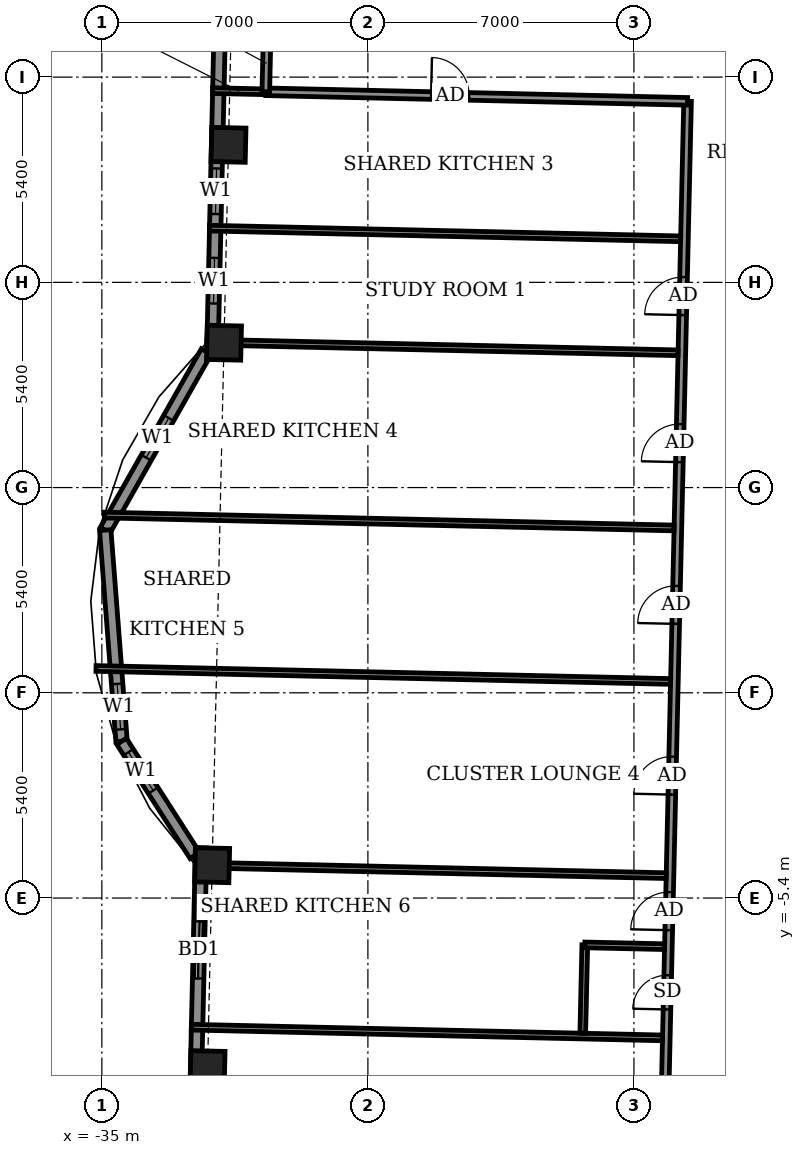
"""IFC4 building model, lengths in metres.
Left out: names, types, materials, properties, quantities, classifications, styles, units other than length and angle.
Written with IfcOpenShell. Run it as: python <this file> out.ifc"""

import sys

from ifc_helpers import new_model, si_unit, direction, frame, frame_2d, origin, origin_2d, place, context, subcontext, project, spatial, rectangle, extrude, element, fill, save


model = new_model("IFC4")
c1 = context("Model", 3, precision=1e-05, world=origin(), true_north=direction((0.0, 1.0)))
c2 = subcontext(c1, "Body", "Model", "MODEL_VIEW")
j1 = project(units=[si_unit("LENGTHUNIT", "METRE"), si_unit("PLANEANGLEUNIT", "RADIAN")], contexts=[c1])
p1 = place(None, origin())
s1 = spatial("IfcSite", under=j1, at=p1, CompositionType="ELEMENT")
p2 = place(p1, origin())
s2 = spatial("IfcBuilding", under=s1, at=p2, CompositionType="ELEMENT")
p3 = place(p2, frame((0.0, 0.0, 309.7)))
s3 = spatial("IfcBuildingStorey", under=s2, at=p3, CompositionType="ELEMENT", Elevation=309.7)
for number, where, z_axis, x_axis in (
    (1, (-32.098, -4.535, -0.55), (0.0, 0.0, 1.0), (-0.023, -1.0, 0.0)),
    (2, (-32.219, -9.875, -0.55), (0.0, 0.0, 1.0), (-0.023, -1.0, 0.0)),
    (3, (-31.668, 14.419, -0.55), (0.0, 0.0, 1.0), (-0.023, -1.0, 0.0)),
    (4, (-31.786, 9.212, -0.55), (0.0, 0.0, 1.0), (-0.023, -1.0, 0.0)),
):
    element("IfcColumn", number, at=place(p3, frame(where, z_axis=z_axis, x_axis=x_axis)), inside=s3, PredefinedType="COLUMN", context=c2, shape_type="SweptSolid", body=[
        extrude(rectangle(XDim=0.9, YDim=0.9, at=origin_2d()), origin(), (0.0, 0.0, 1.0), 3.6),
    ])
p4 = place(p3, frame((-31.735, 24.69, 0.0), z_axis=(0.0, 0.0, 1.0), x_axis=(-0.022658721334, -0.999743258216, 0.0)))
e5 = element("IfcWall", 5, at=p4, inside=s3, PredefinedType="SOLIDWALL", context=c2, shape_type="SweptSolid", body=[
    extrude(rectangle(XDim=15.925, YDim=0.3, at=frame_2d((7.962, 0.0))), origin(), (0.0, 0.0, 1.0), 2.55),
])
p5 = place(p4, frame((1.953, 0.0, 0.0)))
e6 = element("IfcOpeningElement", 6, at=p5, cuts=e5, PredefinedType="OPENING", context=c2, shape_type="SweptSolid", body=[
    extrude(rectangle(XDim=1.5, YDim=2.4, at=frame_2d((0.75, 1.2))), frame((0.0, 0.16, 0.0), z_axis=(0.0, -1.0, 0.0), x_axis=(1.0, 0.0, 0.0)), (0.0, 0.0, 1.0), 0.32),
])
p6 = place(p4, frame((10.896, 0.0, 0.9)))
e7 = element("IfcOpeningElement", 7, at=p6, cuts=e5, PredefinedType="OPENING", context=c2, shape_type="SweptSolid", body=[
    extrude(rectangle(XDim=1.2, YDim=1.5, at=frame_2d((0.6, 0.75))), frame((0.0, 0.16, 0.0), z_axis=(0.0, -1.0, 0.0), x_axis=(1.0, 0.0, 0.0)), (0.0, 0.0, 1.0), 0.32),
])
p7 = place(p4, frame((13.25, 0.0, 0.9)))
e8 = element("IfcOpeningElement", 8, at=p7, cuts=e5, PredefinedType="OPENING", context=c2, shape_type="SweptSolid", body=[
    extrude(rectangle(XDim=1.2, YDim=1.5, at=frame_2d((0.6, 0.75))), frame((0.0, 0.16, 0.0), z_axis=(0.0, -1.0, 0.0), x_axis=(1.0, 0.0, 0.0)), (0.0, 0.0, 1.0), 0.32),
])
p8 = place(p3, frame((-32.252, 8.978, 0.0), z_axis=(0.0, 0.0, 1.0), x_axis=(-0.492554919955, -0.870281363025, 0.0)))
e9 = element("IfcWall", 9, at=p8, inside=s3, PredefinedType="SOLIDWALL", context=c2, shape_type="SweptSolid", body=[
    extrude(rectangle(XDim=5.398, YDim=0.3, at=frame_2d((2.699, 0.0))), origin(), (0.0, 0.0, 1.0), 3.05),
])
p9 = place(p8, frame((2.008, 0.0, 0.9)))
e10 = element("IfcOpeningElement", 10, at=p9, cuts=e9, PredefinedType="OPENING", context=c2, shape_type="SweptSolid", body=[
    extrude(rectangle(XDim=1.2, YDim=1.5, at=frame_2d((0.6, 0.75))), frame((0.0, 0.16, 0.0), z_axis=(0.0, -1.0, 0.0), x_axis=(1.0, 0.0, 0.0)), (0.0, 0.0, 1.0), 0.32),
])
p10 = place(p3, frame((-34.911, 4.28, 0.0), z_axis=(0.0, 0.0, 1.0), x_axis=(0.077135284219, -0.997020635658, 0.0)))
e11 = element("IfcWall", 11, at=p10, inside=s3, PredefinedType="SOLIDWALL", context=c2, shape_type="SweptSolid", body=[
    extrude(rectangle(XDim=5.574, YDim=0.3, at=frame_2d((2.787, 0.0))), origin(), (0.0, 0.0, 1.0), 3.05),
])
p11 = place(p10, frame((4.058, 0.0, 0.9)))
e12 = element("IfcOpeningElement", 12, at=p11, cuts=e11, PredefinedType="OPENING", context=c2, shape_type="SweptSolid", body=[
    extrude(rectangle(XDim=1.2, YDim=1.5, at=frame_2d((0.6, 0.75))), frame((0.0, 0.16, 0.0), z_axis=(0.0, -1.0, 0.0), x_axis=(1.0, 0.0, 0.0)), (0.0, 0.0, 1.0), 0.32),
])
p12 = place(p3, frame((-34.481, -1.277, 0.0), z_axis=(0.0, 0.0, 1.0), x_axis=(0.540460234606, -0.841369558999, 0.0)))
e13 = element("IfcWall", 13, at=p12, inside=s3, PredefinedType="SOLIDWALL", context=c2, shape_type="SweptSolid", body=[
    extrude(rectangle(XDim=3.569, YDim=0.3, at=frame_2d((1.785, 0.0))), origin(), (0.0, 0.0, 1.0), 3.05),
])
p13 = place(p12, frame((0.338, 0.0, 0.9)))
e14 = element("IfcOpeningElement", 14, at=p13, cuts=e13, PredefinedType="OPENING", context=c2, shape_type="SweptSolid", body=[
    extrude(rectangle(XDim=1.2, YDim=1.5, at=frame_2d((0.6, 0.75))), frame((0.0, 0.16, 0.0), z_axis=(0.0, -1.0, 0.0), x_axis=(1.0, 0.0, 0.0)), (0.0, 0.0, 1.0), 0.32),
])
p14 = place(p3, frame((-32.388, -4.079, 0.0), z_axis=(0.0, 0.0, 1.0), x_axis=(-0.022673163436, -0.999742930788, 0.0)))
e15 = element("IfcWall", 15, at=p14, inside=s3, PredefinedType="SOLIDWALL", context=c2, shape_type="SweptSolid", body=[
    extrude(rectangle(XDim=16.324, YDim=0.3, at=frame_2d((8.162, 0.0))), origin(), (0.0, 0.0, 1.0), 2.55),
])
p15 = place(p14, frame((1.937, 0.0, 0.0)))
e16 = element("IfcOpeningElement", 16, at=p15, cuts=e15, PredefinedType="OPENING", context=c2, shape_type="SweptSolid", body=[
    extrude(rectangle(XDim=1.5, YDim=2.4, at=frame_2d((0.75, 1.2))), frame((0.0, 0.16, 0.0), z_axis=(0.0, -1.0, 0.0), x_axis=(1.0, 0.0, 0.0)), (0.0, 0.0, 1.0), 0.32),
])
p16 = place(p14, frame((6.433, 0.0, 0.9)))
e17 = element("IfcOpeningElement", 17, at=p16, cuts=e15, PredefinedType="OPENING", context=c2, shape_type="SweptSolid", body=[
    extrude(rectangle(XDim=0.9, YDim=1.5, at=frame_2d((0.45, 0.75))), frame((0.0, 0.16, 0.0), z_axis=(0.0, -1.0, 0.0), x_axis=(1.0, 0.0, 0.0)), (0.0, 0.0, 1.0), 0.32),
])
p17 = place(p14, frame((12.364, 0.0, 0.9)))
e18 = element("IfcOpeningElement", 18, at=p17, cuts=e15, PredefinedType="OPENING", context=c2, shape_type="SweptSolid", body=[
    extrude(rectangle(XDim=2.4, YDim=1.5, at=frame_2d((1.2, 0.75))), frame((0.0, 0.16, 0.0), z_axis=(0.0, -1.0, 0.0), x_axis=(1.0, 0.0, 0.0)), (0.0, 0.0, 1.0), 0.32),
])
p18 = place(p3, frame((-34.845, 9.532, 0.0), z_axis=(0.0, 0.0, 1.0), x_axis=(0.022681332769, 0.999742745482, 0.0)))
e19 = element("IfcWall", 19, at=p18, inside=s3, PredefinedType="USERDEFINED", context=c2, shape_type="SweptSolid", body=[
    extrude(rectangle(XDim=3.875, YDim=0.55, at=frame_2d((1.938, 0.0))), origin(), (0.0, 0.0, 1.0), 0.8),
])
p19 = place(p3, frame((-35.347, -12.588, 0.0), z_axis=(0.0, 0.0, 1.0), x_axis=(0.022663177671, 0.999743157205, 0.0)))
e20 = element("IfcWall", 20, at=p19, inside=s3, PredefinedType="USERDEFINED", context=c2, shape_type="SweptSolid", body=[
    extrude(rectangle(XDim=6.0, YDim=0.55, at=frame_2d((3.0, 0.0))), origin(), (0.0, 0.0, 1.0), 0.8),
])
p20 = place(p3, frame((-20.216, -12.081, 0.0), z_axis=(0.0, 0.0, 1.0), x_axis=(0.02267447203, 0.999742901109, 0.0)))
e21 = element("IfcWall", 21, at=p20, inside=s3, PredefinedType="PARTITIONING", context=c2, shape_type="SweptSolid", body=[
    extrude(rectangle(XDim=27.65, YDim=0.2, at=frame_2d((13.825, 0.0))), origin(), (0.0, 0.0, 1.0), 3.05),
])
p21 = place(p20, frame((22.025, 0.0, 0.0)))
e22 = element("IfcOpeningElement", 22, at=p21, cuts=e21, PredefinedType="OPENING", context=c2, shape_type="SweptSolid", body=[
    extrude(rectangle(XDim=1.0, YDim=2.1, at=frame_2d((0.5, 1.05))), frame((0.0, 0.11, 0.0), z_axis=(0.0, -1.0, 0.0), x_axis=(1.0, 0.0, 0.0)), (0.0, 0.0, 1.0), 0.22),
])
p22 = place(p20, frame((18.155, 0.0, 0.0)))
e23 = element("IfcOpeningElement", 23, at=p22, cuts=e21, PredefinedType="OPENING", context=c2, shape_type="SweptSolid", body=[
    extrude(rectangle(XDim=1.0, YDim=2.1, at=frame_2d((0.5, 1.05))), frame((0.0, 0.11, 0.0), z_axis=(0.0, -1.0, 0.0), x_axis=(1.0, 0.0, 0.0)), (0.0, 0.0, 1.0), 0.22),
])
p23 = place(p20, frame((13.898, 0.0, 0.0)))
e24 = element("IfcOpeningElement", 24, at=p23, cuts=e21, PredefinedType="OPENING", context=c2, shape_type="SweptSolid", body=[
    extrude(rectangle(XDim=1.0, YDim=2.1, at=frame_2d((0.5, 1.05))), frame((0.0, 0.11, 0.0), z_axis=(0.0, -1.0, 0.0), x_axis=(1.0, 0.0, 0.0)), (0.0, 0.0, 1.0), 0.22),
])
p24 = place(p20, frame((9.405, 0.0, 0.0)))
e25 = element("IfcOpeningElement", 25, at=p24, cuts=e21, PredefinedType="OPENING", context=c2, shape_type="SweptSolid", body=[
    extrude(rectangle(XDim=1.0, YDim=2.1, at=frame_2d((0.5, 1.05))), frame((0.0, 0.11, 0.0), z_axis=(0.0, -1.0, 0.0), x_axis=(1.0, 0.0, 0.0)), (0.0, 0.0, 1.0), 0.22),
])
p25 = place(p20, frame((5.837, 0.0, 0.0)))
e26 = element("IfcOpeningElement", 26, at=p25, cuts=e21, PredefinedType="OPENING", context=c2, shape_type="SweptSolid", body=[
    extrude(rectangle(XDim=1.0, YDim=2.1, at=frame_2d((0.5, 1.05))), frame((0.0, 0.11, 0.0), z_axis=(0.0, -1.0, 0.0), x_axis=(1.0, 0.0, 0.0)), (0.0, 0.0, 1.0), 0.22),
])
p26 = place(p20, frame((3.75, 0.0, 0.0)))
e27 = element("IfcOpeningElement", 27, at=p26, cuts=e21, PredefinedType="OPENING", context=c2, shape_type="SweptSolid", body=[
    extrude(rectangle(XDim=0.9, YDim=2.1, at=frame_2d((0.45, 1.05))), frame((0.0, 0.11, 0.0), z_axis=(0.0, -1.0, 0.0), x_axis=(1.0, 0.0, 0.0)), (0.0, 0.0, 1.0), 0.22),
])
p27 = place(p3, frame((-32.645, -8.798, 0.0), z_axis=(0.0, 0.0, 1.0), x_axis=(0.999741408463, -0.022740189192, 0.0)))
e28 = element("IfcWall", 28, at=p27, inside=s3, PredefinedType="PARTITIONING", context=c2, shape_type="SweptSolid", body=[
    extrude(rectangle(XDim=12.4, YDim=0.15, at=frame_2d((6.2, 0.0))), origin(), (0.0, 0.0, 1.0), 2.55),
])
p28 = place(p3, frame((-22.346, -8.957, 0.0), z_axis=(0.0, 0.0, 1.0), x_axis=(0.02279059109, 0.999740260747, 0.0)))
e29 = element("IfcWall", 29, at=p28, inside=s3, PredefinedType="PARTITIONING", context=c2, shape_type="SweptSolid", body=[
    extrude(rectangle(XDim=2.324, YDim=0.15, at=frame_2d((1.162, 0.0))), origin(), (0.0, 0.0, 1.0), 3.05),
])
p29 = place(p3, frame((-22.293, -6.633, 0.0), z_axis=(0.0, 0.0, 1.0), x_axis=(0.999750703499, -0.022327804475, 0.0)))
e30 = element("IfcWall", 30, at=p29, inside=s3, PredefinedType="PARTITIONING", context=c2, shape_type="SweptSolid", body=[
    extrude(rectangle(XDim=2.099, YDim=0.15, at=frame_2d((1.05, 0.0))), origin(), (0.0, 0.0, 1.0), 3.05),
])
p30 = place(p3, frame((-32.248, -4.536, 0.0), z_axis=(0.0, 0.0, 1.0), x_axis=(0.999741439573, -0.022738821441, 0.0)))
e31 = element("IfcWall", 31, at=p30, inside=s3, PredefinedType="PARTITIONING", context=c2, shape_type="SweptSolid", body=[
    extrude(rectangle(XDim=12.1, YDim=0.15, at=frame_2d((6.05, 0.0))), origin(), (0.0, 0.0, 1.0), 3.05),
])
p31 = place(p3, frame((-35.154, 0.641, 0.0), z_axis=(0.0, 0.0, 1.0), x_axis=(0.99974273487, -0.022681800518, 0.0)))
e32 = element("IfcWall", 32, at=p31, inside=s3, PredefinedType="PARTITIONING", context=c2, shape_type="SweptSolid", body=[
    extrude(rectangle(XDim=15.123, YDim=0.15, at=frame_2d((7.562, 0.0))), origin(), (0.0, 0.0, 1.0), 2.05),
])
p32 = place(p3, frame((-34.934, 4.677, 0.0), z_axis=(0.0, 0.0, 1.0), x_axis=(0.99974273422, -0.022681829163, 0.0)))
e33 = element("IfcWall", 33, at=p32, inside=s3, PredefinedType="PARTITIONING", context=c2, shape_type="SweptSolid", body=[
    extrude(rectangle(XDim=14.994, YDim=0.15, at=frame_2d((7.497, 0.0))), origin(), (0.0, 0.0, 1.0), 2.05),
])
p33 = place(p3, frame((-32.236, 9.227, 0.0), z_axis=(0.0, 0.0, 1.0), x_axis=(0.999743195783, -0.022661475803, 0.0)))
e34 = element("IfcWall", 34, at=p33, inside=s3, PredefinedType="PARTITIONING", context=c2, shape_type="SweptSolid", body=[
    extrude(rectangle(XDim=12.4, YDim=0.15, at=frame_2d((6.2, 0.0))), origin(), (0.0, 0.0, 1.0), 3.05),
])
p34 = place(p3, frame((-32.168, 12.226, 0.0), z_axis=(0.0, 0.0, 1.0), x_axis=(0.999743195783, -0.022661475803, 0.0)))
e35 = element("IfcWall", 35, at=p34, inside=s3, PredefinedType="PARTITIONING", context=c2, shape_type="SweptSolid", body=[
    extrude(rectangle(XDim=12.4, YDim=0.15, at=frame_2d((6.2, 0.0))), origin(), (0.0, 0.0, 1.0), 2.55),
])
p35 = place(p3, frame((-32.086, 15.845, 0.0), z_axis=(0.0, 0.0, 1.0), x_axis=(0.999740667531, -0.022772739949, 0.0)))
e36 = element("IfcWall", 36, at=p35, inside=s3, PredefinedType="PARTITIONING", context=c2, shape_type="SweptSolid", body=[
    extrude(rectangle(XDim=1.404, YDim=0.15, at=frame_2d((0.702, 0.0))), origin(), (0.0, 0.0, 1.0), 2.55),
])
p36 = place(p3, frame((-30.686, 15.814, 0.0), z_axis=(0.0, 0.0, 1.0), x_axis=(0.999742346277, -0.022698921993, 0.0)))
e37 = element("IfcWall", 37, at=p36, inside=s3, PredefinedType="PARTITIONING", context=c2, shape_type="SweptSolid", body=[
    extrude(rectangle(XDim=11.1, YDim=0.2, at=frame_2d((5.55, 0.0))), origin(), (0.0, 0.0, 1.0), 3.05),
])
p37 = place(p36, frame((4.35, 0.0, 0.0)))
e38 = element("IfcOpeningElement", 38, at=p37, cuts=e37, PredefinedType="OPENING", context=c2, shape_type="SweptSolid", body=[
    extrude(rectangle(XDim=1.0, YDim=2.1, at=frame_2d((0.5, 1.05))), frame((0.0, 0.11, 0.0), z_axis=(0.0, -1.0, 0.0), x_axis=(1.0, 0.0, 0.0)), (0.0, 0.0, 1.0), 0.22),
])
p38 = place(p3, frame((-30.686, 15.814, 0.0), z_axis=(0.0, 0.0, 1.0), x_axis=(0.022632637625, 0.99974384905, 0.0)))
e39 = element("IfcWall", 39, at=p38, inside=s3, PredefinedType="PARTITIONING", context=c2, shape_type="SweptSolid", body=[
    extrude(rectangle(XDim=1.5, YDim=0.2, at=frame_2d((0.75, 0.0))), origin(), (0.0, 0.0, 1.0), 3.05),
])
p39 = place(p3, frame((-30.652, 17.313, 0.0), z_axis=(0.0, 0.0, 1.0), x_axis=(0.999742623764, -0.02268669719, 0.0)))
e40 = element("IfcWall", 40, at=p39, inside=s3, PredefinedType="PARTITIONING", context=c2, shape_type="SweptSolid", body=[
    extrude(rectangle(XDim=58.8, YDim=0.2, at=frame_2d((29.4, 0.0))), origin(), (0.0, 0.0, 1.0), 3.05),
])
p40 = place(p39, frame((54.601, 0.0, 0.0)))
e41 = element("IfcOpeningElement", 41, at=p40, cuts=e40, PredefinedType="OPENING", context=c2, shape_type="SweptSolid", body=[
    extrude(rectangle(XDim=1.0, YDim=2.1, at=frame_2d((0.5, 1.05))), frame((0.0, 0.11, 0.0), z_axis=(0.0, -1.0, 0.0), x_axis=(1.0, 0.0, 0.0)), (0.0, 0.0, 1.0), 0.22),
])
p41 = place(p39, frame((49.35, 0.0, 0.0)))
e42 = element("IfcOpeningElement", 42, at=p41, cuts=e40, PredefinedType="OPENING", context=c2, shape_type="SweptSolid", body=[
    extrude(rectangle(XDim=0.9, YDim=2.1, at=frame_2d((0.45, 1.05))), frame((0.0, 0.11, 0.0), z_axis=(0.0, -1.0, 0.0), x_axis=(1.0, 0.0, 0.0)), (0.0, 0.0, 1.0), 0.22),
])
p42 = place(p39, frame((42.55, 0.0, 0.0)))
e43 = element("IfcOpeningElement", 43, at=p42, cuts=e40, PredefinedType="OPENING", context=c2, shape_type="SweptSolid", body=[
    extrude(rectangle(XDim=0.9, YDim=2.1, at=frame_2d((0.45, 1.05))), frame((0.0, 0.11, 0.0), z_axis=(0.0, -1.0, 0.0), x_axis=(1.0, 0.0, 0.0)), (0.0, 0.0, 1.0), 0.22),
])
p43 = place(p39, frame((40.475, 0.0, 0.0)))
e44 = element("IfcOpeningElement", 44, at=p43, cuts=e40, PredefinedType="OPENING", context=c2, shape_type="SweptSolid", body=[
    extrude(rectangle(XDim=0.9, YDim=2.1, at=frame_2d((0.45, 1.05))), frame((0.0, 0.11, 0.0), z_axis=(0.0, -1.0, 0.0), x_axis=(1.0, 0.0, 0.0)), (0.0, 0.0, 1.0), 0.22),
])
p44 = place(p39, frame((33.6, 0.0, 0.0)))
e45 = element("IfcOpeningElement", 45, at=p44, cuts=e40, PredefinedType="OPENING", context=c2, shape_type="SweptSolid", body=[
    extrude(rectangle(XDim=0.9, YDim=2.1, at=frame_2d((0.45, 1.05))), frame((0.0, 0.11, 0.0), z_axis=(0.0, -1.0, 0.0), x_axis=(1.0, 0.0, 0.0)), (0.0, 0.0, 1.0), 0.22),
])
p45 = place(p39, frame((31.55, 0.0, 0.0)))
e46 = element("IfcOpeningElement", 46, at=p45, cuts=e40, PredefinedType="OPENING", context=c2, shape_type="SweptSolid", body=[
    extrude(rectangle(XDim=0.9, YDim=2.1, at=frame_2d((0.45, 1.05))), frame((0.0, 0.11, 0.0), z_axis=(0.0, -1.0, 0.0), x_axis=(1.0, 0.0, 0.0)), (0.0, 0.0, 1.0), 0.22),
])
p46 = place(p39, frame((24.425, 0.0, 0.0)))
e47 = element("IfcOpeningElement", 47, at=p46, cuts=e40, PredefinedType="OPENING", context=c2, shape_type="SweptSolid", body=[
    extrude(rectangle(XDim=0.9, YDim=2.1, at=frame_2d((0.45, 1.05))), frame((0.0, 0.11, 0.0), z_axis=(0.0, -1.0, 0.0), x_axis=(1.0, 0.0, 0.0)), (0.0, 0.0, 1.0), 0.22),
])
p47 = place(p39, frame((22.05, 0.0, 0.0)))
e48 = element("IfcOpeningElement", 48, at=p47, cuts=e40, PredefinedType="OPENING", context=c2, shape_type="SweptSolid", body=[
    extrude(rectangle(XDim=0.9, YDim=2.1, at=frame_2d((0.45, 1.05))), frame((0.0, 0.11, 0.0), z_axis=(0.0, -1.0, 0.0), x_axis=(1.0, 0.0, 0.0)), (0.0, 0.0, 1.0), 0.22),
])
p48 = place(p39, frame((14.95, 0.0, 0.0)))
e49 = element("IfcOpeningElement", 49, at=p48, cuts=e40, PredefinedType="OPENING", context=c2, shape_type="SweptSolid", body=[
    extrude(rectangle(XDim=0.9, YDim=2.1, at=frame_2d((0.45, 1.05))), frame((0.0, 0.11, 0.0), z_axis=(0.0, -1.0, 0.0), x_axis=(1.0, 0.0, 0.0)), (0.0, 0.0, 1.0), 0.22),
])
p49 = place(p39, frame((12.525, 0.0, 0.0)))
e50 = element("IfcOpeningElement", 50, at=p49, cuts=e40, PredefinedType="OPENING", context=c2, shape_type="SweptSolid", body=[
    extrude(rectangle(XDim=0.9, YDim=2.1, at=frame_2d((0.45, 1.05))), frame((0.0, 0.11, 0.0), z_axis=(0.0, -1.0, 0.0), x_axis=(1.0, 0.0, 0.0)), (0.0, 0.0, 1.0), 0.22),
])
p50 = place(p39, frame((4.032, 0.0, 0.0)))
e51 = element("IfcOpeningElement", 51, at=p50, cuts=e40, PredefinedType="OPENING", context=c2, shape_type="SweptSolid", body=[
    extrude(rectangle(XDim=1.0, YDim=2.1, at=frame_2d((0.5, 1.05))), frame((0.0, 0.11, 0.0), z_axis=(0.0, -1.0, 0.0), x_axis=(1.0, 0.0, 0.0)), (0.0, 0.0, 1.0), 0.22),
])
p51 = place(p6, origin())
e52 = element("IfcWindow", 52, at=p51, inside=s3, PartitioningType="SINGLE_PANEL", PredefinedType="WINDOW", context=c2, shape_type="SweptSolid", body=[
    extrude(rectangle(XDim=1.2, YDim=1.5, at=frame_2d((0.6, 0.75))), frame((0.0, 0.03, 0.0), z_axis=(0.0, -1.0, 0.0), x_axis=(1.0, 0.0, 0.0)), (0.0, 0.0, 1.0), 0.06),
])
fill(e7, e52)
p52 = place(p7, origin())
e53 = element("IfcWindow", 53, at=p52, inside=s3, PartitioningType="SINGLE_PANEL", PredefinedType="WINDOW", context=c2, shape_type="SweptSolid", body=[
    extrude(rectangle(XDim=1.2, YDim=1.5, at=frame_2d((0.6, 0.75))), frame((0.0, 0.03, 0.0), z_axis=(0.0, -1.0, 0.0), x_axis=(1.0, 0.0, 0.0)), (0.0, 0.0, 1.0), 0.06),
])
fill(e8, e53)
p53 = place(p9, origin())
e54 = element("IfcWindow", 54, at=p53, inside=s3, PartitioningType="SINGLE_PANEL", PredefinedType="WINDOW", context=c2, shape_type="SweptSolid", body=[
    extrude(rectangle(XDim=1.2, YDim=1.5, at=frame_2d((0.6, 0.75))), frame((0.0, 0.03, 0.0), z_axis=(0.0, -1.0, 0.0), x_axis=(1.0, 0.0, 0.0)), (0.0, 0.0, 1.0), 0.06),
])
fill(e10, e54)
p54 = place(p11, origin())
e55 = element("IfcWindow", 55, at=p54, inside=s3, PartitioningType="SINGLE_PANEL", PredefinedType="WINDOW", context=c2, shape_type="SweptSolid", body=[
    extrude(rectangle(XDim=1.2, YDim=1.5, at=frame_2d((0.6, 0.75))), frame((0.0, 0.03, 0.0), z_axis=(0.0, -1.0, 0.0), x_axis=(1.0, 0.0, 0.0)), (0.0, 0.0, 1.0), 0.06),
])
fill(e12, e55)
p55 = place(p13, origin())
e56 = element("IfcWindow", 56, at=p55, inside=s3, PartitioningType="SINGLE_PANEL", PredefinedType="WINDOW", context=c2, shape_type="SweptSolid", body=[
    extrude(rectangle(XDim=1.2, YDim=1.5, at=frame_2d((0.6, 0.75))), frame((0.0, 0.03, 0.0), z_axis=(0.0, -1.0, 0.0), x_axis=(1.0, 0.0, 0.0)), (0.0, 0.0, 1.0), 0.06),
])
fill(e14, e56)
p56 = place(p15, origin())
e57 = element("IfcDoor", 57, at=p56, inside=s3, OperationType="SLIDING_TO_LEFT", PredefinedType="DOOR", context=c2, shape_type="SweptSolid", body=[
    extrude(rectangle(XDim=1.5, YDim=2.4, at=frame_2d((0.75, 1.2))), frame((0.0, 0.025, 0.0), z_axis=(0.0, -1.0, 0.0), x_axis=(1.0, 0.0, 0.0)), (0.0, 0.0, 1.0), 0.05),
])
fill(e16, e57)
p57 = place(p37, origin())
e58 = element("IfcDoor", 58, at=p57, inside=s3, OperationType="SINGLE_SWING_LEFT", PredefinedType="DOOR", context=c2, shape_type="SweptSolid", body=[
    extrude(rectangle(XDim=1.0, YDim=2.1, at=frame_2d((0.5, 1.05))), frame((0.0, 0.025, 0.0), z_axis=(0.0, -1.0, 0.0), x_axis=(1.0, 0.0, 0.0)), (0.0, 0.0, 1.0), 0.05),
])
fill(e38, e58)
p58 = place(p21, origin())
e59 = element("IfcDoor", 59, at=p58, inside=s3, OperationType="SINGLE_SWING_RIGHT", PredefinedType="DOOR", context=c2, shape_type="SweptSolid", body=[
    extrude(rectangle(XDim=1.0, YDim=2.1, at=frame_2d((0.5, 1.05))), frame((0.0, 0.025, 0.0), z_axis=(0.0, -1.0, 0.0), x_axis=(1.0, 0.0, 0.0)), (0.0, 0.0, 1.0), 0.05),
])
fill(e22, e59)
p59 = place(p22, origin())
e60 = element("IfcDoor", 60, at=p59, inside=s3, OperationType="SINGLE_SWING_LEFT", PredefinedType="DOOR", context=c2, shape_type="SweptSolid", body=[
    extrude(rectangle(XDim=1.0, YDim=2.1, at=frame_2d((0.5, 1.05))), frame((0.0, 0.025, 0.0), z_axis=(0.0, -1.0, 0.0), x_axis=(1.0, 0.0, 0.0)), (0.0, 0.0, 1.0), 0.05),
])
fill(e23, e60)
p60 = place(p23, origin())
e61 = element("IfcDoor", 61, at=p60, inside=s3, OperationType="SINGLE_SWING_RIGHT", PredefinedType="DOOR", context=c2, shape_type="SweptSolid", body=[
    extrude(rectangle(XDim=1.0, YDim=2.1, at=frame_2d((0.5, 1.05))), frame((0.0, 0.025, 0.0), z_axis=(0.0, -1.0, 0.0), x_axis=(1.0, 0.0, 0.0)), (0.0, 0.0, 1.0), 0.05),
])
fill(e24, e61)
p61 = place(p24, origin())
e62 = element("IfcDoor", 62, at=p61, inside=s3, OperationType="SINGLE_SWING_LEFT", PredefinedType="DOOR", context=c2, shape_type="SweptSolid", body=[
    extrude(rectangle(XDim=1.0, YDim=2.1, at=frame_2d((0.5, 1.05))), frame((0.0, 0.025, 0.0), z_axis=(0.0, -1.0, 0.0), x_axis=(1.0, 0.0, 0.0)), (0.0, 0.0, 1.0), 0.05),
])
fill(e25, e62)
p62 = place(p25, origin())
e63 = element("IfcDoor", 63, at=p62, inside=s3, OperationType="SINGLE_SWING_RIGHT", PredefinedType="DOOR", context=c2, shape_type="SweptSolid", body=[
    extrude(rectangle(XDim=1.0, YDim=2.1, at=frame_2d((0.5, 1.05))), frame((0.0, 0.025, 0.0), z_axis=(0.0, -1.0, 0.0), x_axis=(1.0, 0.0, 0.0)), (0.0, 0.0, 1.0), 0.05),
])
fill(e26, e63)
p63 = place(p26, origin())
e64 = element("IfcDoor", 64, at=p63, inside=s3, OperationType="SINGLE_SWING_LEFT", PredefinedType="DOOR", context=c2, shape_type="SweptSolid", body=[
    extrude(rectangle(XDim=0.9, YDim=2.1, at=frame_2d((0.45, 1.05))), frame((0.0, 0.025, 0.0), z_axis=(0.0, -1.0, 0.0), x_axis=(1.0, 0.0, 0.0)), (0.0, 0.0, 1.0), 0.05),
])
fill(e27, e64)
save(model, sys.argv[1])
